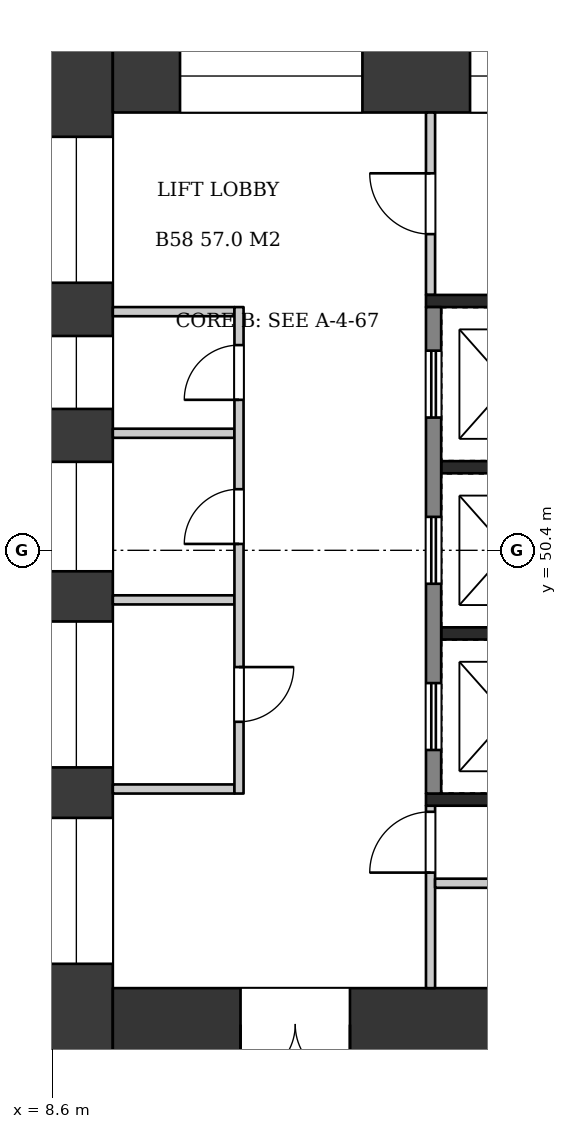
"""IFC4 building model, lengths in metres.
Left out: names, types, materials, properties, quantities, classifications, styles, units other than length and angle.
Written with IfcOpenShell. Run it as: python <this file> out.ifc"""

import sys

from ifc_helpers import new_model, si_unit, direction, frame, frame_2d, origin, place, context, subcontext, project, spatial, rectangle, extrude, element, fill, save


model = new_model("IFC4")
c1 = context("Model", 3, precision=1e-05, world=origin(), true_north=direction((0.0, 1.0)))
c2 = subcontext(c1, "Body", "Model", "MODEL_VIEW")
j1 = project(units=[si_unit("LENGTHUNIT", "METRE"), si_unit("PLANEANGLEUNIT", "RADIAN")], contexts=[c1])
p1 = place(None, origin())
s1 = spatial("IfcSite", under=j1, at=p1, CompositionType="ELEMENT")
p2 = place(p1, origin())
s2 = spatial("IfcBuilding", under=s1, at=p2, CompositionType="ELEMENT")
p3 = place(p2, frame((0.0, 0.0, 224.7)))
s3 = spatial("IfcBuildingStorey", under=s2, at=p3, CompositionType="ELEMENT", Elevation=224.7)
p4 = place(p3, frame((9.0, 58.8, 0.0), z_axis=(0.0, 0.0, 1.0), x_axis=(0.0, -1.0, 0.0)))
e1 = element("IfcWall", 1, at=p4, inside=s3, PredefinedType="SHEAR", context=c2, shape_type="SweptSolid", body=[
    extrude(rectangle(XDim=16.8, YDim=1.2, at=frame_2d((8.4, 0.0))), origin(), (0.0, 0.0, 1.0), 3.22),
])
p5 = place(p4, frame((1.6, 0.0, 0.6)))
e2 = element("IfcOpeningElement", 2, at=p5, cuts=e1, PredefinedType="OPENING", context=c2, shape_type="SweptSolid", body=[
    extrude(rectangle(XDim=2.4, YDim=2.1, at=frame_2d((1.2, 1.05))), frame((0.0, 0.61, 0.0), z_axis=(0.0, -1.0, 0.0), x_axis=(1.0, 0.0, 0.0)), (0.0, 0.0, 1.0), 1.22),
])
p6 = place(p4, frame((4.875, 0.0, 1.6)))
e3 = element("IfcOpeningElement", 3, at=p6, cuts=e1, PredefinedType="OPENING", context=c2, shape_type="SweptSolid", body=[
    extrude(rectangle(XDim=1.2, YDim=1.2, at=frame_2d((0.6, 0.6))), frame((0.0, 0.61, 0.0), z_axis=(0.0, -1.0, 0.0), x_axis=(1.0, 0.0, 0.0)), (0.0, 0.0, 1.0), 1.22),
])
p7 = place(p4, frame((6.945, 0.0, 1.6)))
e4 = element("IfcOpeningElement", 4, at=p7, cuts=e1, PredefinedType="OPENING", context=c2, shape_type="SweptSolid", body=[
    extrude(rectangle(XDim=1.8, YDim=1.2, at=frame_2d((0.9, 0.6))), frame((0.0, 0.61, 0.0), z_axis=(0.0, -1.0, 0.0), x_axis=(1.0, 0.0, 0.0)), (0.0, 0.0, 1.0), 1.22),
])
p8 = place(p4, frame((9.57, 0.0, 1.6)))
e5 = element("IfcOpeningElement", 5, at=p8, cuts=e1, PredefinedType="OPENING", context=c2, shape_type="SweptSolid", body=[
    extrude(rectangle(XDim=2.4, YDim=1.2, at=frame_2d((1.2, 0.6))), frame((0.0, 0.61, 0.0), z_axis=(0.0, -1.0, 0.0), x_axis=(1.0, 0.0, 0.0)), (0.0, 0.0, 1.0), 1.22),
])
p9 = place(p4, frame((12.8, 0.0, 0.6)))
e6 = element("IfcOpeningElement", 6, at=p9, cuts=e1, PredefinedType="OPENING", context=c2, shape_type="SweptSolid", body=[
    extrude(rectangle(XDim=2.4, YDim=2.1, at=frame_2d((1.2, 1.05))), frame((0.0, 0.61, 0.0), z_axis=(0.0, -1.0, 0.0), x_axis=(1.0, 0.0, 0.0)), (0.0, 0.0, 1.0), 1.22),
])
p10 = place(p3, frame((9.6, 58.2, 0.0), z_axis=(0.0, 0.0, 1.0), x_axis=(1.0, 0.0, 0.0)))
e7 = element("IfcWall", 7, at=p10, inside=s3, PredefinedType="SHEAR", context=c2, shape_type="SweptSolid", body=[
    extrude(rectangle(XDim=14.4, YDim=1.2, at=frame_2d((7.2, 0.0))), origin(), (0.0, 0.0, 1.0), 3.22),
])
p11 = place(p10, frame((1.105, 0.0, 0.6)))
e8 = element("IfcOpeningElement", 8, at=p11, cuts=e7, PredefinedType="OPENING", context=c2, shape_type="SweptSolid", body=[
    extrude(rectangle(XDim=3.0, YDim=2.1, at=frame_2d((1.5, 1.05))), frame((0.0, 0.61, 0.0), z_axis=(0.0, -1.0, 0.0), x_axis=(1.0, 0.0, 0.0)), (0.0, 0.0, 1.0), 1.22),
])
p12 = place(p10, frame((5.875, 0.0, 0.6)))
e9 = element("IfcOpeningElement", 9, at=p12, cuts=e7, PredefinedType="OPENING", context=c2, shape_type="SweptSolid", body=[
    extrude(rectangle(XDim=2.4, YDim=2.1, at=frame_2d((1.2, 1.05))), frame((0.0, 0.61, 0.0), z_axis=(0.0, -1.0, 0.0), x_axis=(1.0, 0.0, 0.0)), (0.0, 0.0, 1.0), 1.22),
])
p13 = place(p10, frame((9.993, 0.0, 0.5)))
e10 = element("IfcOpeningElement", 10, at=p13, cuts=e7, PredefinedType="OPENING", context=c2, shape_type="SweptSolid", body=[
    extrude(rectangle(XDim=1.2, YDim=2.4, at=frame_2d((0.6, 1.2))), frame((0.0, 0.61, 0.0), z_axis=(0.0, -1.0, 0.0), x_axis=(1.0, 0.0, 0.0)), (0.0, 0.0, 1.0), 1.22),
])
p14 = place(p10, frame((12.197, 0.0, 0.5)))
e11 = element("IfcOpeningElement", 11, at=p14, cuts=e7, PredefinedType="OPENING", context=c2, shape_type="SweptSolid", body=[
    extrude(rectangle(XDim=1.2, YDim=2.4, at=frame_2d((0.6, 1.2))), frame((0.0, 0.61, 0.0), z_axis=(0.0, -1.0, 0.0), x_axis=(1.0, 0.0, 0.0)), (0.0, 0.0, 1.0), 1.22),
])
p15 = place(p3, frame((9.6, 42.6, 0.0), z_axis=(0.0, 0.0, 1.0), x_axis=(1.0, 0.0, 0.0)))
e12 = element("IfcWall", 12, at=p15, inside=s3, PredefinedType="SHEAR", context=c2, shape_type="SweptSolid", body=[
    extrude(rectangle(XDim=14.4, YDim=1.2, at=frame_2d((7.2, 0.0))), origin(), (0.0, 0.0, 1.0), 3.22),
])
p16 = place(p15, frame((2.1, 0.0, 0.0)))
e13 = element("IfcOpeningElement", 13, at=p16, cuts=e12, PredefinedType="OPENING", context=c2, shape_type="SweptSolid", body=[
    extrude(rectangle(XDim=1.8, YDim=2.1, at=frame_2d((0.9, 1.05))), frame((0.0, 0.61, 0.0), z_axis=(0.0, -1.0, 0.0), x_axis=(1.0, 0.0, 0.0)), (0.0, 0.0, 1.0), 1.22),
])
for number, where, z_axis, x_axis in (
    (14, (9.6, 54.325, 0.0), (0.0, 0.0, 1.0), (1.0, 0.0, 0.0)),
    (15, (9.6, 46.475, 0.0), (0.0, 0.0, 1.0), (1.0, 0.0, 0.0)),
    (16, (9.6, 52.325, 0.0), (0.0, 0.0, 1.0), (1.0, 0.0, 0.0)),
    (17, (9.6, 49.585, 0.0), (0.0, 0.0, 1.0), (1.0, 0.0, 0.0)),
):
    element("IfcWall", number, at=place(p3, frame(where, z_axis=z_axis, x_axis=x_axis)), inside=s3, PredefinedType="PARTITIONING", context=c2, shape_type="SweptSolid", body=[
        extrude(rectangle(XDim=2.0, YDim=0.15, at=frame_2d((1.0, 0.0))), origin(), (0.0, 0.0, 1.0), 3.22),
    ])
p17 = place(p3, frame((11.675, 54.4, 0.0), z_axis=(0.0, 0.0, 1.0), x_axis=(0.0, -1.0, 0.0)))
e18 = element("IfcWall", 18, at=p17, inside=s3, PredefinedType="PARTITIONING", context=c2, shape_type="SweptSolid", body=[
    extrude(rectangle(XDim=8.0, YDim=0.15, at=frame_2d((4.0, 0.0))), origin(), (0.0, 0.0, 1.0), 3.22),
])
p18 = place(p17, frame((0.625, 0.0, 0.0)))
e19 = element("IfcOpeningElement", 19, at=p18, cuts=e18, PredefinedType="OPENING", context=c2, shape_type="SweptSolid", body=[
    extrude(rectangle(XDim=0.9, YDim=2.1, at=frame_2d((0.45, 1.05))), frame((0.0, 0.085, 0.0), z_axis=(0.0, -1.0, 0.0), x_axis=(1.0, 0.0, 0.0)), (0.0, 0.0, 1.0), 0.17),
])
p19 = place(p17, frame((2.995, 0.0, 0.0)))
e20 = element("IfcOpeningElement", 20, at=p19, cuts=e18, PredefinedType="OPENING", context=c2, shape_type="SweptSolid", body=[
    extrude(rectangle(XDim=0.9, YDim=2.1, at=frame_2d((0.45, 1.05))), frame((0.0, 0.085, 0.0), z_axis=(0.0, -1.0, 0.0), x_axis=(1.0, 0.0, 0.0)), (0.0, 0.0, 1.0), 0.17),
])
p20 = place(p17, frame((5.92, 0.0, 0.0)))
e21 = element("IfcOpeningElement", 21, at=p20, cuts=e18, PredefinedType="OPENING", context=c2, shape_type="SweptSolid", body=[
    extrude(rectangle(XDim=0.9, YDim=2.1, at=frame_2d((0.45, 1.05))), frame((0.0, 0.085, 0.0), z_axis=(0.0, -1.0, 0.0), x_axis=(1.0, 0.0, 0.0)), (0.0, 0.0, 1.0), 0.17),
])
for number, where, z_axis, x_axis in (
    (22, (15.0, 51.767, 0.0), (0.0, 0.0, 1.0), (1.0, 0.0, 0.0)),
    (23, (15.0, 49.033, 0.0), (0.0, 0.0, 1.0), (1.0, 0.0, 0.0)),
):
    element("IfcWall", number, at=place(p3, frame(where, z_axis=z_axis, x_axis=x_axis)), inside=s3, PredefinedType="SHEAR", context=c2, shape_type="SweptSolid", body=[
        extrude(rectangle(XDim=1.9, YDim=0.2, at=frame_2d((0.95, 0.0))), origin(), (0.0, 0.0, 1.0), 3.22),
    ])
p21 = place(p3, frame((14.875, 54.4, 0.0), z_axis=(0.0, 0.0, 1.0), x_axis=(0.0, -1.0, 0.0)))
e24 = element("IfcWall", 24, at=p21, inside=s3, PredefinedType="SHEAR", context=c2, shape_type="SweptSolid", body=[
    extrude(rectangle(XDim=8.0, YDim=0.25, at=frame_2d((4.0, 0.0))), origin(), (0.0, 0.0, 1.0), 3.22),
])
p22 = place(p21, frame((0.717, 0.0, 0.0)))
e25 = element("IfcOpeningElement", 25, at=p22, cuts=e24, PredefinedType="OPENING", context=c2, shape_type="SweptSolid", body=[
    extrude(rectangle(XDim=1.1, YDim=2.1, at=frame_2d((0.55, 1.05))), frame((0.0, 0.135, 0.0), z_axis=(0.0, -1.0, 0.0), x_axis=(1.0, 0.0, 0.0)), (0.0, 0.0, 1.0), 0.27),
])
p23 = place(p21, frame((3.45, 0.0, 0.0)))
e26 = element("IfcOpeningElement", 26, at=p23, cuts=e24, PredefinedType="OPENING", context=c2, shape_type="SweptSolid", body=[
    extrude(rectangle(XDim=1.1, YDim=2.1, at=frame_2d((0.55, 1.05))), frame((0.0, 0.135, 0.0), z_axis=(0.0, -1.0, 0.0), x_axis=(1.0, 0.0, 0.0)), (0.0, 0.0, 1.0), 0.27),
])
p24 = place(p21, frame((6.183, 0.0, 0.0)))
e27 = element("IfcOpeningElement", 27, at=p24, cuts=e24, PredefinedType="OPENING", context=c2, shape_type="SweptSolid", body=[
    extrude(rectangle(XDim=1.1, YDim=2.1, at=frame_2d((0.55, 1.05))), frame((0.0, 0.135, 0.0), z_axis=(0.0, -1.0, 0.0), x_axis=(1.0, 0.0, 0.0)), (0.0, 0.0, 1.0), 0.27),
])
p25 = place(p3, frame((14.75, 54.5, 0.0), z_axis=(0.0, 0.0, 1.0), x_axis=(1.0, 0.0, 0.0)))
e28 = element("IfcWall", 28, at=p25, inside=s3, PredefinedType="SHEAR", context=c2, shape_type="SweptSolid", body=[
    extrude(rectangle(XDim=2.4, YDim=0.2, at=frame_2d((1.2, 0.0))), origin(), (0.0, 0.0, 1.0), 3.22),
])
p26 = place(p3, frame((14.825, 57.6, 0.0), z_axis=(0.0, 0.0, 1.0), x_axis=(0.0, -1.0, 0.0)))
e29 = element("IfcWall", 29, at=p26, inside=s3, PredefinedType="PARTITIONING", context=c2, shape_type="SweptSolid", body=[
    extrude(rectangle(XDim=3.0, YDim=0.15, at=frame_2d((1.5, 0.0))), origin(), (0.0, 0.0, 1.0), 3.22),
])
p27 = place(p26, frame((1.0, 0.0, 0.0)))
e30 = element("IfcOpeningElement", 30, at=p27, cuts=e29, PredefinedType="OPENING", context=c2, shape_type="SweptSolid", body=[
    extrude(rectangle(XDim=1.0, YDim=2.1, at=frame_2d((0.5, 1.05))), frame((0.0, 0.085, 0.0), z_axis=(0.0, -1.0, 0.0), x_axis=(1.0, 0.0, 0.0)), (0.0, 0.0, 1.0), 0.17),
])
p28 = place(p3, frame((14.75, 46.3, 0.0), z_axis=(0.0, 0.0, 1.0), x_axis=(1.0, 0.0, 0.0)))
e31 = element("IfcWall", 31, at=p28, inside=s3, PredefinedType="SHEAR", context=c2, shape_type="SweptSolid", body=[
    extrude(rectangle(XDim=9.25, YDim=0.2, at=frame_2d((4.625, 0.0))), origin(), (0.0, 0.0, 1.0), 3.22),
])
p29 = place(p3, frame((14.825, 46.2, 0.0), z_axis=(0.0, 0.0, 1.0), x_axis=(0.0, -1.0, 0.0)))
e32 = element("IfcWall", 32, at=p29, inside=s3, PredefinedType="PARTITIONING", context=c2, shape_type="SweptSolid", body=[
    extrude(rectangle(XDim=3.0, YDim=0.15, at=frame_2d((1.5, 0.0))), origin(), (0.0, 0.0, 1.0), 3.22),
])
p30 = place(p29, frame((0.1, 0.0, 0.0)))
e33 = element("IfcOpeningElement", 33, at=p30, cuts=e32, PredefinedType="OPENING", context=c2, shape_type="SweptSolid", body=[
    extrude(rectangle(XDim=1.0, YDim=2.1, at=frame_2d((0.5, 1.05))), frame((0.0, 0.085, 0.0), z_axis=(0.0, -1.0, 0.0), x_axis=(1.0, 0.0, 0.0)), (0.0, 0.0, 1.0), 0.17),
])
p31 = place(p3, frame((14.9, 44.925, 0.0), z_axis=(0.0, 0.0, 1.0), x_axis=(1.0, 0.0, 0.0)))
e34 = element("IfcWall", 34, at=p31, inside=s3, PredefinedType="PARTITIONING", context=c2, shape_type="SweptSolid", body=[
    extrude(rectangle(XDim=9.1, YDim=0.15, at=frame_2d((4.55, 0.0))), origin(), (0.0, 0.0, 1.0), 3.22),
])
p32 = place(p31, frame((1.26, 0.0, 0.0)))
e35 = element("IfcOpeningElement", 35, at=p32, cuts=e34, PredefinedType="OPENING", context=c2, shape_type="SweptSolid", body=[
    extrude(rectangle(XDim=1.0, YDim=2.1, at=frame_2d((0.5, 1.05))), frame((0.0, 0.085, 0.0), z_axis=(0.0, -1.0, 0.0), x_axis=(1.0, 0.0, 0.0)), (0.0, 0.0, 1.0), 0.17),
])
p33 = place(p31, frame((4.54, 0.0, 0.0)))
e36 = element("IfcOpeningElement", 36, at=p33, cuts=e34, PredefinedType="OPENING", context=c2, shape_type="SweptSolid", body=[
    extrude(rectangle(XDim=0.9, YDim=2.1, at=frame_2d((0.45, 1.05))), frame((0.0, 0.085, 0.0), z_axis=(0.0, -1.0, 0.0), x_axis=(1.0, 0.0, 0.0)), (0.0, 0.0, 1.0), 0.17),
])
p34 = place(p31, frame((7.28, 0.0, 0.0)))
e37 = element("IfcOpeningElement", 37, at=p34, cuts=e34, PredefinedType="OPENING", context=c2, shape_type="SweptSolid", body=[
    extrude(rectangle(XDim=1.0, YDim=2.1, at=frame_2d((0.5, 1.05))), frame((0.0, 0.085, 0.0), z_axis=(0.0, -1.0, 0.0), x_axis=(1.0, 0.0, 0.0)), (0.0, 0.0, 1.0), 0.17),
])
p35 = place(p16, frame((1.8, 0.0, 0.0), z_axis=(0.0, 0.0, 1.0), x_axis=(-1.0, 0.0, 0.0)))
e38 = element("IfcDoor", 38, at=p35, inside=s3, OperationType="DOUBLE_DOOR_SINGLE_SWING", PredefinedType="DOOR", context=c2, shape_type="SweptSolid", body=[
    extrude(rectangle(XDim=1.8, YDim=2.1, at=frame_2d((0.9, 1.05))), frame((0.0, 0.025, 0.0), z_axis=(0.0, -1.0, 0.0), x_axis=(1.0, 0.0, 0.0)), (0.0, 0.0, 1.0), 0.05),
])
fill(e13, e38)
p36 = place(p18, frame((0.9, 0.0, 0.0), z_axis=(0.0, 0.0, 1.0), x_axis=(-1.0, 0.0, 0.0)))
e39 = element("IfcDoor", 39, at=p36, inside=s3, OperationType="SINGLE_SWING_LEFT", PredefinedType="DOOR", context=c2, shape_type="SweptSolid", body=[
    extrude(rectangle(XDim=0.9, YDim=2.1, at=frame_2d((0.45, 1.05))), frame((0.0, 0.025, 0.0), z_axis=(0.0, -1.0, 0.0), x_axis=(1.0, 0.0, 0.0)), (0.0, 0.0, 1.0), 0.05),
])
fill(e19, e39)
p37 = place(p19, frame((0.9, 0.0, 0.0), z_axis=(0.0, 0.0, 1.0), x_axis=(-1.0, 0.0, 0.0)))
e40 = element("IfcDoor", 40, at=p37, inside=s3, OperationType="SINGLE_SWING_LEFT", PredefinedType="DOOR", context=c2, shape_type="SweptSolid", body=[
    extrude(rectangle(XDim=0.9, YDim=2.1, at=frame_2d((0.45, 1.05))), frame((0.0, 0.025, 0.0), z_axis=(0.0, -1.0, 0.0), x_axis=(1.0, 0.0, 0.0)), (0.0, 0.0, 1.0), 0.05),
])
fill(e20, e40)
p38 = place(p20, origin())
e41 = element("IfcDoor", 41, at=p38, inside=s3, OperationType="SINGLE_SWING_LEFT", PredefinedType="DOOR", context=c2, shape_type="SweptSolid", body=[
    extrude(rectangle(XDim=0.9, YDim=2.1, at=frame_2d((0.45, 1.05))), frame((0.0, 0.025, 0.0), z_axis=(0.0, -1.0, 0.0), x_axis=(1.0, 0.0, 0.0)), (0.0, 0.0, 1.0), 0.05),
])
fill(e21, e41)
p39 = place(p22, origin())
e42 = element("IfcDoor", 42, at=p39, inside=s3, OperationType="DOUBLE_DOOR_SLIDING", PredefinedType="DOOR", context=c2, shape_type="SweptSolid", body=[
    extrude(rectangle(XDim=1.1, YDim=2.1, at=frame_2d((0.55, 1.05))), frame((0.0, 0.025, 0.0), z_axis=(0.0, -1.0, 0.0), x_axis=(1.0, 0.0, 0.0)), (0.0, 0.0, 1.0), 0.05),
])
fill(e25, e42)
p40 = place(p23, origin())
e43 = element("IfcDoor", 43, at=p40, inside=s3, OperationType="DOUBLE_DOOR_SLIDING", PredefinedType="DOOR", context=c2, shape_type="SweptSolid", body=[
    extrude(rectangle(XDim=1.1, YDim=2.1, at=frame_2d((0.55, 1.05))), frame((0.0, 0.025, 0.0), z_axis=(0.0, -1.0, 0.0), x_axis=(1.0, 0.0, 0.0)), (0.0, 0.0, 1.0), 0.05),
])
fill(e26, e43)
p41 = place(p24, origin())
e44 = element("IfcDoor", 44, at=p41, inside=s3, OperationType="DOUBLE_DOOR_SLIDING", PredefinedType="DOOR", context=c2, shape_type="SweptSolid", body=[
    extrude(rectangle(XDim=1.1, YDim=2.1, at=frame_2d((0.55, 1.05))), frame((0.0, 0.025, 0.0), z_axis=(0.0, -1.0, 0.0), x_axis=(1.0, 0.0, 0.0)), (0.0, 0.0, 1.0), 0.05),
])
fill(e27, e44)
p42 = place(p27, frame((1.0, 0.0, 0.0), z_axis=(0.0, 0.0, 1.0), x_axis=(-1.0, 0.0, 0.0)))
e45 = element("IfcDoor", 45, at=p42, inside=s3, OperationType="SINGLE_SWING_RIGHT", PredefinedType="DOOR", context=c2, shape_type="SweptSolid", body=[
    extrude(rectangle(XDim=1.0, YDim=2.1, at=frame_2d((0.5, 1.05))), frame((0.0, 0.025, 0.0), z_axis=(0.0, -1.0, 0.0), x_axis=(1.0, 0.0, 0.0)), (0.0, 0.0, 1.0), 0.05),
])
fill(e30, e45)
p43 = place(p30, frame((1.0, 0.0, 0.0), z_axis=(0.0, 0.0, 1.0), x_axis=(-1.0, 0.0, 0.0)))
e46 = element("IfcDoor", 46, at=p43, inside=s3, OperationType="SINGLE_SWING_LEFT", PredefinedType="DOOR", context=c2, shape_type="SweptSolid", body=[
    extrude(rectangle(XDim=1.0, YDim=2.1, at=frame_2d((0.5, 1.05))), frame((0.0, 0.025, 0.0), z_axis=(0.0, -1.0, 0.0), x_axis=(1.0, 0.0, 0.0)), (0.0, 0.0, 1.0), 0.05),
])
fill(e33, e46)
p44 = place(p5, origin())
e47 = element("IfcWindow", 47, at=p44, inside=s3, PartitioningType="SINGLE_PANEL", PredefinedType="WINDOW", context=c2, shape_type="SweptSolid", body=[
    extrude(rectangle(XDim=2.4, YDim=2.1, at=frame_2d((1.2, 1.05))), frame((0.0, 0.03, 0.0), z_axis=(0.0, -1.0, 0.0), x_axis=(1.0, 0.0, 0.0)), (0.0, 0.0, 1.0), 0.06),
])
fill(e2, e47)
p45 = place(p6, origin())
e48 = element("IfcWindow", 48, at=p45, inside=s3, PartitioningType="SINGLE_PANEL", PredefinedType="WINDOW", context=c2, shape_type="SweptSolid", body=[
    extrude(rectangle(XDim=1.2, YDim=1.2, at=frame_2d((0.6, 0.6))), frame((0.0, 0.03, 0.0), z_axis=(0.0, -1.0, 0.0), x_axis=(1.0, 0.0, 0.0)), (0.0, 0.0, 1.0), 0.06),
])
fill(e3, e48)
p46 = place(p7, origin())
e49 = element("IfcWindow", 49, at=p46, inside=s3, PartitioningType="SINGLE_PANEL", PredefinedType="WINDOW", context=c2, shape_type="SweptSolid", body=[
    extrude(rectangle(XDim=1.8, YDim=1.2, at=frame_2d((0.9, 0.6))), frame((0.0, 0.03, 0.0), z_axis=(0.0, -1.0, 0.0), x_axis=(1.0, 0.0, 0.0)), (0.0, 0.0, 1.0), 0.06),
])
fill(e4, e49)
p47 = place(p8, origin())
e50 = element("IfcWindow", 50, at=p47, inside=s3, PartitioningType="SINGLE_PANEL", PredefinedType="WINDOW", context=c2, shape_type="SweptSolid", body=[
    extrude(rectangle(XDim=2.4, YDim=1.2, at=frame_2d((1.2, 0.6))), frame((0.0, 0.03, 0.0), z_axis=(0.0, -1.0, 0.0), x_axis=(1.0, 0.0, 0.0)), (0.0, 0.0, 1.0), 0.06),
])
fill(e5, e50)
p48 = place(p9, origin())
e51 = element("IfcWindow", 51, at=p48, inside=s3, PartitioningType="SINGLE_PANEL", PredefinedType="WINDOW", context=c2, shape_type="SweptSolid", body=[
    extrude(rectangle(XDim=2.4, YDim=2.1, at=frame_2d((1.2, 1.05))), frame((0.0, 0.03, 0.0), z_axis=(0.0, -1.0, 0.0), x_axis=(1.0, 0.0, 0.0)), (0.0, 0.0, 1.0), 0.06),
])
fill(e6, e51)
p49 = place(p11, origin())
e52 = element("IfcWindow", 52, at=p49, inside=s3, PartitioningType="SINGLE_PANEL", PredefinedType="WINDOW", context=c2, shape_type="SweptSolid", body=[
    extrude(rectangle(XDim=3.0, YDim=2.1, at=frame_2d((1.5, 1.05))), frame((0.0, 0.03, 0.0), z_axis=(0.0, -1.0, 0.0), x_axis=(1.0, 0.0, 0.0)), (0.0, 0.0, 1.0), 0.06),
])
fill(e8, e52)
p50 = place(p12, origin())
e53 = element("IfcWindow", 53, at=p50, inside=s3, PartitioningType="SINGLE_PANEL", PredefinedType="WINDOW", context=c2, shape_type="SweptSolid", body=[
    extrude(rectangle(XDim=2.4, YDim=2.1, at=frame_2d((1.2, 1.05))), frame((0.0, 0.03, 0.0), z_axis=(0.0, -1.0, 0.0), x_axis=(1.0, 0.0, 0.0)), (0.0, 0.0, 1.0), 0.06),
])
fill(e9, e53)
save(model, sys.argv[1])
